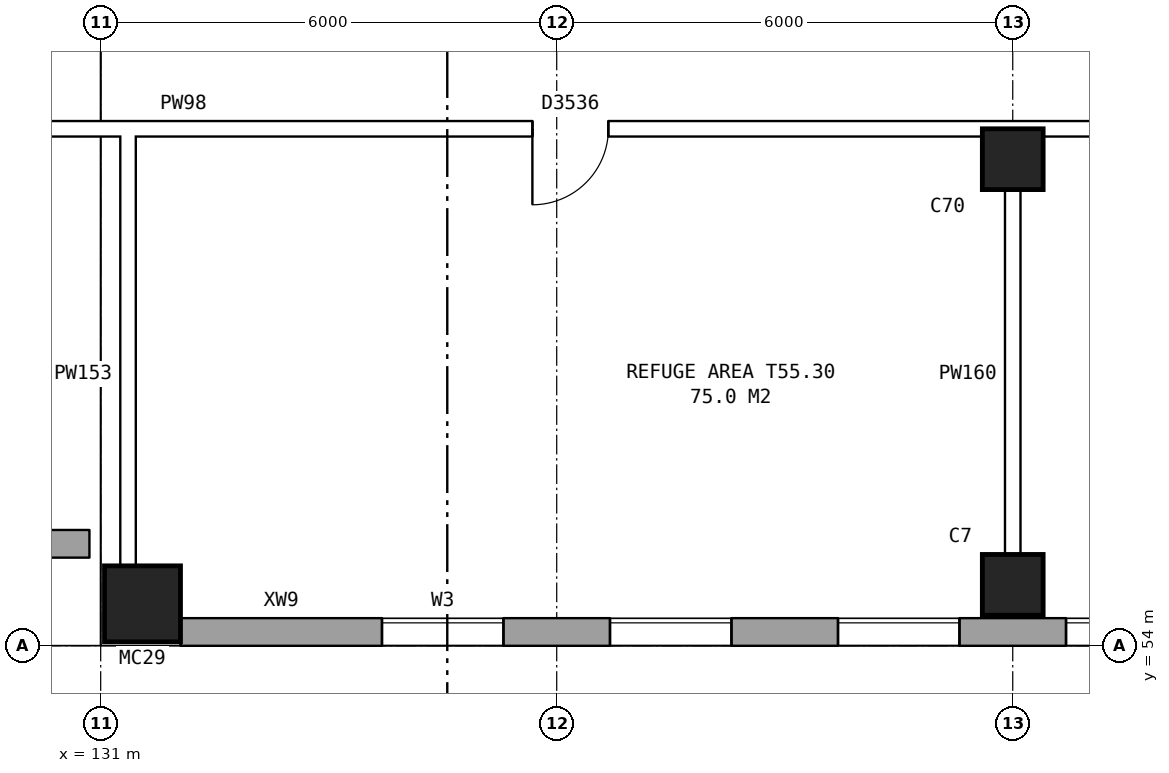
"""IFC4 building model, lengths in metres.
Left out: names, types, materials, properties, quantities, classifications, styles, units other than length and angle.
Written with IfcOpenShell. Run it as: python <this file> out.ifc"""

import sys

from ifc_helpers import new_model, si_unit, direction, frame, frame_2d, origin, origin_2d, place, context, subcontext, project, spatial, rectangle, hollow_rectangle, extrude, element, fill, save


model = new_model("IFC4")
c1 = context("Model", 3, precision=1e-05, world=origin(), true_north=direction((0.0, 1.0)))
c2 = subcontext(c1, "Body", "Model", "MODEL_VIEW")
j1 = project(units=[si_unit("LENGTHUNIT", "METRE"), si_unit("PLANEANGLEUNIT", "RADIAN")], contexts=[c1])
p1 = place(None, origin())
s1 = spatial("IfcSite", under=j1, at=p1, CompositionType="ELEMENT")
p2 = place(p1, origin())
s2 = spatial("IfcBuilding", under=s1, at=p2, CompositionType="ELEMENT")
p3 = place(p2, frame((0.0, 0.0, 194.4)))
s3 = spatial("IfcBuildingStorey", under=s2, at=p3, CompositionType="ELEMENT", Elevation=194.4)
for number, where, z_axis, x_axis in (
    (1, (143.0, 54.8, 0.0), (0.0, 0.0, 1.0), (1.0, 0.0, 0.0)),
    (2, (143.0, 60.4, 0.0), (0.0, 0.0, 1.0), (1.0, 0.0, 0.0)),
):
    element("IfcColumn", number, at=place(p3, frame(where, z_axis=z_axis, x_axis=x_axis)), inside=s3, PredefinedType="COLUMN", context=c2, shape_type="SweptSolid", body=[
        extrude(rectangle(XDim=0.8, YDim=0.8, at=origin_2d()), origin(), (0.0, 0.0, 1.0), 3.95),
    ])
p4 = place(p3, frame((131.55, 54.55, 0.0), z_axis=(0.0, 0.0, 1.0), x_axis=(1.0, 0.0, 0.0)))
e3 = element("IfcColumn", 3, at=p4, inside=s3, PredefinedType="COLUMN", context=c2, shape_type="SweptSolid", body=[
    extrude(hollow_rectangle(XDim=1.0, YDim=1.0, WallThickness=0.055, at=origin_2d()), origin(), (0.0, 0.0, 1.0), 4.2),
])
p5 = place(p3, frame((76.15, 55.34, 0.0), z_axis=(0.0, 0.0, 1.0), x_axis=(1.0, 0.0, 0.0)))
e4 = element("IfcWall", 4, at=p5, inside=s3, PredefinedType="STANDARD", context=c2, shape_type="SweptSolid", body=[
    extrude(rectangle(XDim=54.7, YDim=0.36, at=frame_2d((27.35, 0.0))), origin(), (0.0, 0.0, 1.0), 3.95),
])
p6 = place(p5, frame((0.769, 0.0, 1.5)))
e5 = element("IfcOpeningElement", 5, at=p6, cuts=e4, PredefinedType="OPENING", context=c2, shape_type="SweptSolid", body=[
    extrude(rectangle(XDim=1.6, YDim=1.2, at=frame_2d((0.8, 0.6))), frame((0.0, 0.19, 0.0), z_axis=(0.0, -1.0, 0.0), x_axis=(1.0, 0.0, 0.0)), (0.0, 0.0, 1.0), 0.38),
])
p7 = place(p5, frame((2.7, 0.0, 1.5)))
e6 = element("IfcOpeningElement", 6, at=p7, cuts=e4, PredefinedType="OPENING", context=c2, shape_type="SweptSolid", body=[
    extrude(rectangle(XDim=0.6, YDim=1.2, at=frame_2d((0.3, 0.6))), frame((0.0, 0.19, 0.0), z_axis=(0.0, -1.0, 0.0), x_axis=(1.0, 0.0, 0.0)), (0.0, 0.0, 1.0), 0.38),
])
p8 = place(p5, frame((7.644, 0.0, 1.5)))
e7 = element("IfcOpeningElement", 7, at=p8, cuts=e4, PredefinedType="OPENING", context=c2, shape_type="SweptSolid", body=[
    extrude(rectangle(XDim=1.6, YDim=1.2, at=frame_2d((0.8, 0.6))), frame((0.0, 0.19, 0.0), z_axis=(0.0, -1.0, 0.0), x_axis=(1.0, 0.0, 0.0)), (0.0, 0.0, 1.0), 0.38),
])
p9 = place(p5, frame((5.3, 0.0, 1.5)))
e8 = element("IfcOpeningElement", 8, at=p9, cuts=e4, PredefinedType="OPENING", context=c2, shape_type="SweptSolid", body=[
    extrude(rectangle(XDim=1.6, YDim=1.2, at=frame_2d((0.8, 0.6))), frame((0.0, 0.19, 0.0), z_axis=(0.0, -1.0, 0.0), x_axis=(1.0, 0.0, 0.0)), (0.0, 0.0, 1.0), 0.38),
])
p10 = place(p5, frame((14.519, 0.0, 1.5)))
e9 = element("IfcOpeningElement", 9, at=p10, cuts=e4, PredefinedType="OPENING", context=c2, shape_type="SweptSolid", body=[
    extrude(rectangle(XDim=1.6, YDim=1.2, at=frame_2d((0.8, 0.6))), frame((0.0, 0.19, 0.0), z_axis=(0.0, -1.0, 0.0), x_axis=(1.0, 0.0, 0.0)), (0.0, 0.0, 1.0), 0.38),
])
p11 = place(p5, frame((16.45, 0.0, 1.5)))
e10 = element("IfcOpeningElement", 10, at=p11, cuts=e4, PredefinedType="OPENING", context=c2, shape_type="SweptSolid", body=[
    extrude(rectangle(XDim=0.6, YDim=1.2, at=frame_2d((0.3, 0.6))), frame((0.0, 0.19, 0.0), z_axis=(0.0, -1.0, 0.0), x_axis=(1.0, 0.0, 0.0)), (0.0, 0.0, 1.0), 0.38),
])
p12 = place(p5, frame((21.394, 0.0, 1.5)))
e11 = element("IfcOpeningElement", 11, at=p12, cuts=e4, PredefinedType="OPENING", context=c2, shape_type="SweptSolid", body=[
    extrude(rectangle(XDim=1.6, YDim=1.2, at=frame_2d((0.8, 0.6))), frame((0.0, 0.19, 0.0), z_axis=(0.0, -1.0, 0.0), x_axis=(1.0, 0.0, 0.0)), (0.0, 0.0, 1.0), 0.38),
])
p13 = place(p5, frame((19.05, 0.0, 1.5)))
e12 = element("IfcOpeningElement", 12, at=p13, cuts=e4, PredefinedType="OPENING", context=c2, shape_type="SweptSolid", body=[
    extrude(rectangle(XDim=1.6, YDim=1.2, at=frame_2d((0.8, 0.6))), frame((0.0, 0.19, 0.0), z_axis=(0.0, -1.0, 0.0), x_axis=(1.0, 0.0, 0.0)), (0.0, 0.0, 1.0), 0.38),
])
p14 = place(p5, frame((27.55, 0.0, 1.5)))
e13 = element("IfcOpeningElement", 13, at=p14, cuts=e4, PredefinedType="OPENING", context=c2, shape_type="SweptSolid", body=[
    extrude(rectangle(XDim=1.2, YDim=1.2, at=frame_2d((0.6, 0.6))), frame((0.0, 0.19, 0.0), z_axis=(0.0, -1.0, 0.0), x_axis=(1.0, 0.0, 0.0)), (0.0, 0.0, 1.0), 0.38),
])
p15 = place(p5, frame((31.706, 0.0, 1.5)))
e14 = element("IfcOpeningElement", 14, at=p15, cuts=e4, PredefinedType="OPENING", context=c2, shape_type="SweptSolid", body=[
    extrude(rectangle(XDim=1.6, YDim=1.2, at=frame_2d((0.8, 0.6))), frame((0.0, 0.19, 0.0), z_axis=(0.0, -1.0, 0.0), x_axis=(1.0, 0.0, 0.0)), (0.0, 0.0, 1.0), 0.38),
])
p16 = place(p5, frame((30.65, 0.0, 1.5)))
e15 = element("IfcOpeningElement", 15, at=p16, cuts=e4, PredefinedType="OPENING", context=c2, shape_type="SweptSolid", body=[
    extrude(rectangle(XDim=0.6, YDim=1.2, at=frame_2d((0.3, 0.6))), frame((0.0, 0.19, 0.0), z_axis=(0.0, -1.0, 0.0), x_axis=(1.0, 0.0, 0.0)), (0.0, 0.0, 1.0), 0.38),
])
p17 = place(p5, frame((38.581, 0.0, 1.5)))
e16 = element("IfcOpeningElement", 16, at=p17, cuts=e4, PredefinedType="OPENING", context=c2, shape_type="SweptSolid", body=[
    extrude(rectangle(XDim=1.6, YDim=1.2, at=frame_2d((0.8, 0.6))), frame((0.0, 0.19, 0.0), z_axis=(0.0, -1.0, 0.0), x_axis=(1.0, 0.0, 0.0)), (0.0, 0.0, 1.0), 0.38),
])
p18 = place(p5, frame((41.3, 0.0, 1.5)))
e17 = element("IfcOpeningElement", 17, at=p18, cuts=e4, PredefinedType="OPENING", context=c2, shape_type="SweptSolid", body=[
    extrude(rectangle(XDim=1.2, YDim=1.2, at=frame_2d((0.6, 0.6))), frame((0.0, 0.19, 0.0), z_axis=(0.0, -1.0, 0.0), x_axis=(1.0, 0.0, 0.0)), (0.0, 0.0, 1.0), 0.38),
])
p19 = place(p5, frame((45.456, 0.0, 1.5)))
e18 = element("IfcOpeningElement", 18, at=p19, cuts=e4, PredefinedType="OPENING", context=c2, shape_type="SweptSolid", body=[
    extrude(rectangle(XDim=1.6, YDim=1.2, at=frame_2d((0.8, 0.6))), frame((0.0, 0.19, 0.0), z_axis=(0.0, -1.0, 0.0), x_axis=(1.0, 0.0, 0.0)), (0.0, 0.0, 1.0), 0.38),
])
p20 = place(p5, frame((44.4, 0.0, 1.5)))
e19 = element("IfcOpeningElement", 19, at=p20, cuts=e4, PredefinedType="OPENING", context=c2, shape_type="SweptSolid", body=[
    extrude(rectangle(XDim=0.6, YDim=1.2, at=frame_2d((0.3, 0.6))), frame((0.0, 0.19, 0.0), z_axis=(0.0, -1.0, 0.0), x_axis=(1.0, 0.0, 0.0)), (0.0, 0.0, 1.0), 0.38),
])
p21 = place(p5, frame((52.331, 0.0, 1.5)))
e20 = element("IfcOpeningElement", 20, at=p21, cuts=e4, PredefinedType="OPENING", context=c2, shape_type="SweptSolid", body=[
    extrude(rectangle(XDim=1.6, YDim=1.2, at=frame_2d((0.8, 0.6))), frame((0.0, 0.19, 0.0), z_axis=(0.0, -1.0, 0.0), x_axis=(1.0, 0.0, 0.0)), (0.0, 0.0, 1.0), 0.38),
])
p22 = place(p5, frame((9.55, 0.0, 1.5)))
e21 = element("IfcOpeningElement", 21, at=p22, cuts=e4, PredefinedType="OPENING", context=c2, shape_type="SweptSolid", body=[
    extrude(rectangle(XDim=0.6, YDim=1.2, at=frame_2d((0.3, 0.6))), frame((0.0, 0.19, 0.0), z_axis=(0.0, -1.0, 0.0), x_axis=(1.0, 0.0, 0.0)), (0.0, 0.0, 1.0), 0.38),
])
p23 = place(p5, frame((12.15, 0.0, 1.5)))
e22 = element("IfcOpeningElement", 22, at=p23, cuts=e4, PredefinedType="OPENING", context=c2, shape_type="SweptSolid", body=[
    extrude(rectangle(XDim=1.2, YDim=1.2, at=frame_2d((0.6, 0.6))), frame((0.0, 0.19, 0.0), z_axis=(0.0, -1.0, 0.0), x_axis=(1.0, 0.0, 0.0)), (0.0, 0.0, 1.0), 0.38),
])
p24 = place(p5, frame((23.3, 0.0, 1.5)))
e23 = element("IfcOpeningElement", 23, at=p24, cuts=e4, PredefinedType="OPENING", context=c2, shape_type="SweptSolid", body=[
    extrude(rectangle(XDim=0.6, YDim=1.2, at=frame_2d((0.3, 0.6))), frame((0.0, 0.19, 0.0), z_axis=(0.0, -1.0, 0.0), x_axis=(1.0, 0.0, 0.0)), (0.0, 0.0, 1.0), 0.38),
])
p25 = place(p5, frame((25.9, 0.0, 1.5)))
e24 = element("IfcOpeningElement", 24, at=p25, cuts=e4, PredefinedType="OPENING", context=c2, shape_type="SweptSolid", body=[
    extrude(rectangle(XDim=1.2, YDim=1.2, at=frame_2d((0.6, 0.6))), frame((0.0, 0.19, 0.0), z_axis=(0.0, -1.0, 0.0), x_axis=(1.0, 0.0, 0.0)), (0.0, 0.0, 1.0), 0.38),
])
p26 = place(p5, frame((33.65, 0.0, 1.5)))
e25 = element("IfcOpeningElement", 25, at=p26, cuts=e4, PredefinedType="OPENING", context=c2, shape_type="SweptSolid", body=[
    extrude(rectangle(XDim=1.6, YDim=1.2, at=frame_2d((0.8, 0.6))), frame((0.0, 0.19, 0.0), z_axis=(0.0, -1.0, 0.0), x_axis=(1.0, 0.0, 0.0)), (0.0, 0.0, 1.0), 0.38),
])
p27 = place(p5, frame((37.5, 0.0, 1.5)))
e26 = element("IfcOpeningElement", 26, at=p27, cuts=e4, PredefinedType="OPENING", context=c2, shape_type="SweptSolid", body=[
    extrude(rectangle(XDim=0.6, YDim=1.2, at=frame_2d((0.3, 0.6))), frame((0.0, 0.19, 0.0), z_axis=(0.0, -1.0, 0.0), x_axis=(1.0, 0.0, 0.0)), (0.0, 0.0, 1.0), 0.38),
])
p28 = place(p5, frame((47.4, 0.0, 1.5)))
e27 = element("IfcOpeningElement", 27, at=p28, cuts=e4, PredefinedType="OPENING", context=c2, shape_type="SweptSolid", body=[
    extrude(rectangle(XDim=1.6, YDim=1.2, at=frame_2d((0.8, 0.6))), frame((0.0, 0.19, 0.0), z_axis=(0.0, -1.0, 0.0), x_axis=(1.0, 0.0, 0.0)), (0.0, 0.0, 1.0), 0.38),
])
p29 = place(p5, frame((51.25, 0.0, 1.5)))
e28 = element("IfcOpeningElement", 28, at=p29, cuts=e4, PredefinedType="OPENING", context=c2, shape_type="SweptSolid", body=[
    extrude(rectangle(XDim=0.6, YDim=1.2, at=frame_2d((0.3, 0.6))), frame((0.0, 0.19, 0.0), z_axis=(0.0, -1.0, 0.0), x_axis=(1.0, 0.0, 0.0)), (0.0, 0.0, 1.0), 0.38),
])
p30 = place(p3, frame((132.05, 54.18, 0.0), z_axis=(0.0, 0.0, 1.0), x_axis=(1.0, 0.0, 0.0)))
e29 = element("IfcWall", 29, at=p30, inside=s3, PredefinedType="STANDARD", context=c2, shape_type="SweptSolid", body=[
    extrude(rectangle(XDim=33.875, YDim=0.36, at=frame_2d((16.938, 0.0))), origin(), (0.0, 0.0, 1.0), 3.95),
])
p31 = place(p30, frame((2.65, 0.0, 1.5)))
e30 = element("IfcOpeningElement", 30, at=p31, cuts=e29, PredefinedType="OPENING", context=c2, shape_type="SweptSolid", body=[
    extrude(rectangle(XDim=1.6, YDim=1.2, at=frame_2d((0.8, 0.6))), frame((0.0, 0.19, 0.0), z_axis=(0.0, -1.0, 0.0), x_axis=(1.0, 0.0, 0.0)), (0.0, 0.0, 1.0), 0.38),
])
p32 = place(p30, frame((5.65, 0.0, 1.5)))
e31 = element("IfcOpeningElement", 31, at=p32, cuts=e29, PredefinedType="OPENING", context=c2, shape_type="SweptSolid", body=[
    extrude(rectangle(XDim=1.6, YDim=1.2, at=frame_2d((0.8, 0.6))), frame((0.0, 0.19, 0.0), z_axis=(0.0, -1.0, 0.0), x_axis=(1.0, 0.0, 0.0)), (0.0, 0.0, 1.0), 0.38),
])
p33 = place(p30, frame((8.65, 0.0, 1.5)))
e32 = element("IfcOpeningElement", 32, at=p33, cuts=e29, PredefinedType="OPENING", context=c2, shape_type="SweptSolid", body=[
    extrude(rectangle(XDim=1.6, YDim=1.2, at=frame_2d((0.8, 0.6))), frame((0.0, 0.19, 0.0), z_axis=(0.0, -1.0, 0.0), x_axis=(1.0, 0.0, 0.0)), (0.0, 0.0, 1.0), 0.38),
])
p34 = place(p30, frame((11.65, 0.0, 1.5)))
e33 = element("IfcOpeningElement", 33, at=p34, cuts=e29, PredefinedType="OPENING", context=c2, shape_type="SweptSolid", body=[
    extrude(rectangle(XDim=1.6, YDim=1.2, at=frame_2d((0.8, 0.6))), frame((0.0, 0.19, 0.0), z_axis=(0.0, -1.0, 0.0), x_axis=(1.0, 0.0, 0.0)), (0.0, 0.0, 1.0), 0.38),
])
p35 = place(p30, frame((14.65, 0.0, 1.5)))
e34 = element("IfcOpeningElement", 34, at=p35, cuts=e29, PredefinedType="OPENING", context=c2, shape_type="SweptSolid", body=[
    extrude(rectangle(XDim=1.6, YDim=1.2, at=frame_2d((0.8, 0.6))), frame((0.0, 0.19, 0.0), z_axis=(0.0, -1.0, 0.0), x_axis=(1.0, 0.0, 0.0)), (0.0, 0.0, 1.0), 0.38),
])
p36 = place(p30, frame((17.65, 0.0, 1.5)))
e35 = element("IfcOpeningElement", 35, at=p36, cuts=e29, PredefinedType="OPENING", context=c2, shape_type="SweptSolid", body=[
    extrude(rectangle(XDim=1.6, YDim=1.2, at=frame_2d((0.8, 0.6))), frame((0.0, 0.19, 0.0), z_axis=(0.0, -1.0, 0.0), x_axis=(1.0, 0.0, 0.0)), (0.0, 0.0, 1.0), 0.38),
])
p37 = place(p30, frame((20.65, 0.0, 1.5)))
e36 = element("IfcOpeningElement", 36, at=p37, cuts=e29, PredefinedType="OPENING", context=c2, shape_type="SweptSolid", body=[
    extrude(rectangle(XDim=1.6, YDim=1.2, at=frame_2d((0.8, 0.6))), frame((0.0, 0.19, 0.0), z_axis=(0.0, -1.0, 0.0), x_axis=(1.0, 0.0, 0.0)), (0.0, 0.0, 1.0), 0.38),
])
p38 = place(p30, frame((23.65, 0.0, 1.5)))
e37 = element("IfcOpeningElement", 37, at=p38, cuts=e29, PredefinedType="OPENING", context=c2, shape_type="SweptSolid", body=[
    extrude(rectangle(XDim=1.6, YDim=1.2, at=frame_2d((0.8, 0.6))), frame((0.0, 0.19, 0.0), z_axis=(0.0, -1.0, 0.0), x_axis=(1.0, 0.0, 0.0)), (0.0, 0.0, 1.0), 0.38),
])
p39 = place(p30, frame((26.65, 0.0, 1.5)))
e38 = element("IfcOpeningElement", 38, at=p39, cuts=e29, PredefinedType="OPENING", context=c2, shape_type="SweptSolid", body=[
    extrude(rectangle(XDim=1.6, YDim=1.2, at=frame_2d((0.8, 0.6))), frame((0.0, 0.19, 0.0), z_axis=(0.0, -1.0, 0.0), x_axis=(1.0, 0.0, 0.0)), (0.0, 0.0, 1.0), 0.38),
])
p40 = place(p30, frame((29.65, 0.0, 1.5)))
e39 = element("IfcOpeningElement", 39, at=p40, cuts=e29, PredefinedType="OPENING", context=c2, shape_type="SweptSolid", body=[
    extrude(rectangle(XDim=1.6, YDim=1.2, at=frame_2d((0.8, 0.6))), frame((0.0, 0.19, 0.0), z_axis=(0.0, -1.0, 0.0), x_axis=(1.0, 0.0, 0.0)), (0.0, 0.0, 1.0), 0.38),
])
p41 = place(p3, frame((32.24, 60.8, 0.0), z_axis=(0.0, 0.0, 1.0), x_axis=(1.0, 0.0, 0.0)))
e40 = element("IfcWall", 40, at=p41, inside=s3, PredefinedType="PARTITIONING", context=c2, shape_type="SweptSolid", body=[
    extrude(rectangle(XDim=136.52, YDim=0.2, at=frame_2d((68.26, 0.0))), origin(), (0.0, 0.0, 1.0), 3.95),
])
p42 = place(p41, frame((3.44, 0.0, 0.0)))
e41 = element("IfcOpeningElement", 41, at=p42, cuts=e40, PredefinedType="OPENING", context=c2, shape_type="SweptSolid", body=[
    extrude(rectangle(XDim=1.0, YDim=2.1, at=frame_2d((0.5, 1.05))), frame((0.0, 0.11, 0.0), z_axis=(0.0, -1.0, 0.0), x_axis=(1.0, 0.0, 0.0)), (0.0, 0.0, 1.0), 0.22),
])
p43 = place(p41, frame((13.26, 0.0, 0.0)))
e42 = element("IfcOpeningElement", 42, at=p43, cuts=e40, PredefinedType="OPENING", context=c2, shape_type="SweptSolid", body=[
    extrude(rectangle(XDim=1.0, YDim=2.1, at=frame_2d((0.5, 1.05))), frame((0.0, 0.11, 0.0), z_axis=(0.0, -1.0, 0.0), x_axis=(1.0, 0.0, 0.0)), (0.0, 0.0, 1.0), 0.22),
])
p44 = place(p41, frame((25.26, 0.0, 0.0)))
e43 = element("IfcOpeningElement", 43, at=p44, cuts=e40, PredefinedType="OPENING", context=c2, shape_type="SweptSolid", body=[
    extrude(rectangle(XDim=1.0, YDim=2.1, at=frame_2d((0.5, 1.05))), frame((0.0, 0.11, 0.0), z_axis=(0.0, -1.0, 0.0), x_axis=(1.0, 0.0, 0.0)), (0.0, 0.0, 1.0), 0.22),
])
p45 = place(p41, frame((37.08, 0.0, 0.0)))
e44 = element("IfcOpeningElement", 44, at=p45, cuts=e40, PredefinedType="OPENING", context=c2, shape_type="SweptSolid", body=[
    extrude(rectangle(XDim=1.0, YDim=2.1, at=frame_2d((0.5, 1.05))), frame((0.0, 0.11, 0.0), z_axis=(0.0, -1.0, 0.0), x_axis=(1.0, 0.0, 0.0)), (0.0, 0.0, 1.0), 0.22),
])
p46 = place(p41, frame((49.955, 0.0, 0.0)))
e45 = element("IfcOpeningElement", 45, at=p46, cuts=e40, PredefinedType="OPENING", context=c2, shape_type="SweptSolid", body=[
    extrude(rectangle(XDim=1.0, YDim=2.1, at=frame_2d((0.5, 1.05))), frame((0.0, 0.11, 0.0), z_axis=(0.0, -1.0, 0.0), x_axis=(1.0, 0.0, 0.0)), (0.0, 0.0, 1.0), 0.22),
])
p47 = place(p41, frame((63.885, 0.0, 0.0)))
e46 = element("IfcOpeningElement", 46, at=p47, cuts=e40, PredefinedType="OPENING", context=c2, shape_type="SweptSolid", body=[
    extrude(rectangle(XDim=1.0, YDim=2.1, at=frame_2d((0.5, 1.05))), frame((0.0, 0.11, 0.0), z_axis=(0.0, -1.0, 0.0), x_axis=(1.0, 0.0, 0.0)), (0.0, 0.0, 1.0), 0.22),
])
p48 = place(p41, frame((77.635, 0.0, 0.0)))
e47 = element("IfcOpeningElement", 47, at=p48, cuts=e40, PredefinedType="OPENING", context=c2, shape_type="SweptSolid", body=[
    extrude(rectangle(XDim=1.0, YDim=2.1, at=frame_2d((0.5, 1.05))), frame((0.0, 0.11, 0.0), z_axis=(0.0, -1.0, 0.0), x_axis=(1.0, 0.0, 0.0)), (0.0, 0.0, 1.0), 0.22),
])
p49 = place(p41, frame((91.565, 0.0, 0.0)))
e48 = element("IfcOpeningElement", 48, at=p49, cuts=e40, PredefinedType="OPENING", context=c2, shape_type="SweptSolid", body=[
    extrude(rectangle(XDim=1.0, YDim=2.1, at=frame_2d((0.5, 1.05))), frame((0.0, 0.11, 0.0), z_axis=(0.0, -1.0, 0.0), x_axis=(1.0, 0.0, 0.0)), (0.0, 0.0, 1.0), 0.22),
])
p50 = place(p41, frame((104.44, 0.0, 0.0)))
e49 = element("IfcOpeningElement", 49, at=p50, cuts=e40, PredefinedType="OPENING", context=c2, shape_type="SweptSolid", body=[
    extrude(rectangle(XDim=1.0, YDim=2.1, at=frame_2d((0.5, 1.05))), frame((0.0, 0.11, 0.0), z_axis=(0.0, -1.0, 0.0), x_axis=(1.0, 0.0, 0.0)), (0.0, 0.0, 1.0), 0.22),
])
p51 = place(p41, frame((116.26, 0.0, 0.0)))
e50 = element("IfcOpeningElement", 50, at=p51, cuts=e40, PredefinedType="OPENING", context=c2, shape_type="SweptSolid", body=[
    extrude(rectangle(XDim=1.0, YDim=2.1, at=frame_2d((0.5, 1.05))), frame((0.0, 0.11, 0.0), z_axis=(0.0, -1.0, 0.0), x_axis=(1.0, 0.0, 0.0)), (0.0, 0.0, 1.0), 0.22),
])
p52 = place(p41, frame((129.08, 0.0, 0.0)))
e51 = element("IfcOpeningElement", 51, at=p52, cuts=e40, PredefinedType="OPENING", context=c2, shape_type="SweptSolid", body=[
    extrude(rectangle(XDim=1.0, YDim=2.1, at=frame_2d((0.5, 1.05))), frame((0.0, 0.11, 0.0), z_axis=(0.0, -1.0, 0.0), x_axis=(1.0, 0.0, 0.0)), (0.0, 0.0, 1.0), 0.22),
])
for number, where, z_axis, x_axis in (
    (52, (131.36, 54.24, 0.0), (0.0, 0.0, 1.0), (0.0, 1.0, 0.0)),
    (53, (143.0, 54.24, 0.0), (0.0, 0.0, 1.0), (0.0, 1.0, 0.0)),
):
    element("IfcWall", number, at=place(p3, frame(where, z_axis=z_axis, x_axis=x_axis)), inside=s3, PredefinedType="PARTITIONING", context=c2, shape_type="SweptSolid", body=[
        extrude(rectangle(XDim=6.66, YDim=0.2, at=frame_2d((3.33, 0.0))), origin(), (0.0, 0.0, 1.0), 3.95),
    ])
p53 = place(p31, origin())
e54 = element("IfcWindow", 54, at=p53, inside=s3, PartitioningType="DOUBLE_PANEL_HORIZONTAL", PredefinedType="WINDOW", context=c2, shape_type="SweptSolid", body=[
    extrude(rectangle(XDim=1.6, YDim=1.2, at=frame_2d((0.8, 0.6))), frame((0.0, 0.15, 0.0), z_axis=(0.0, -1.0, 0.0), x_axis=(1.0, 0.0, 0.0)), (0.0, 0.0, 1.0), 0.06),
])
fill(e30, e54)
p54 = place(p32, origin())
e55 = element("IfcWindow", 55, at=p54, inside=s3, PartitioningType="DOUBLE_PANEL_HORIZONTAL", PredefinedType="WINDOW", context=c2, shape_type="SweptSolid", body=[
    extrude(rectangle(XDim=1.6, YDim=1.2, at=frame_2d((0.8, 0.6))), frame((0.0, 0.15, 0.0), z_axis=(0.0, -1.0, 0.0), x_axis=(1.0, 0.0, 0.0)), (0.0, 0.0, 1.0), 0.06),
])
fill(e31, e55)
p55 = place(p33, origin())
e56 = element("IfcWindow", 56, at=p55, inside=s3, PartitioningType="DOUBLE_PANEL_HORIZONTAL", PredefinedType="WINDOW", context=c2, shape_type="SweptSolid", body=[
    extrude(rectangle(XDim=1.6, YDim=1.2, at=frame_2d((0.8, 0.6))), frame((0.0, 0.15, 0.0), z_axis=(0.0, -1.0, 0.0), x_axis=(1.0, 0.0, 0.0)), (0.0, 0.0, 1.0), 0.06),
])
fill(e32, e56)
p56 = place(p34, origin())
e57 = element("IfcWindow", 57, at=p56, inside=s3, PartitioningType="DOUBLE_PANEL_HORIZONTAL", PredefinedType="WINDOW", context=c2, shape_type="SweptSolid", body=[
    extrude(rectangle(XDim=1.6, YDim=1.2, at=frame_2d((0.8, 0.6))), frame((0.0, 0.15, 0.0), z_axis=(0.0, -1.0, 0.0), x_axis=(1.0, 0.0, 0.0)), (0.0, 0.0, 1.0), 0.06),
])
fill(e33, e57)
p57 = place(p50, frame((1.0, 0.0, 0.0), z_axis=(0.0, 0.0, 1.0), x_axis=(-1.0, 0.0, 0.0)))
e58 = element("IfcDoor", 58, at=p57, inside=s3, OperationType="SINGLE_SWING_RIGHT", PredefinedType="DOOR", context=c2, shape_type="SweptSolid", body=[
    extrude(rectangle(XDim=1.0, YDim=2.1, at=frame_2d((0.5, 1.05))), frame((0.0, 0.025, 0.0), z_axis=(0.0, -1.0, 0.0), x_axis=(1.0, 0.0, 0.0)), (0.0, 0.0, 1.0), 0.05),
])
fill(e49, e58)
save(model, sys.argv[1])
